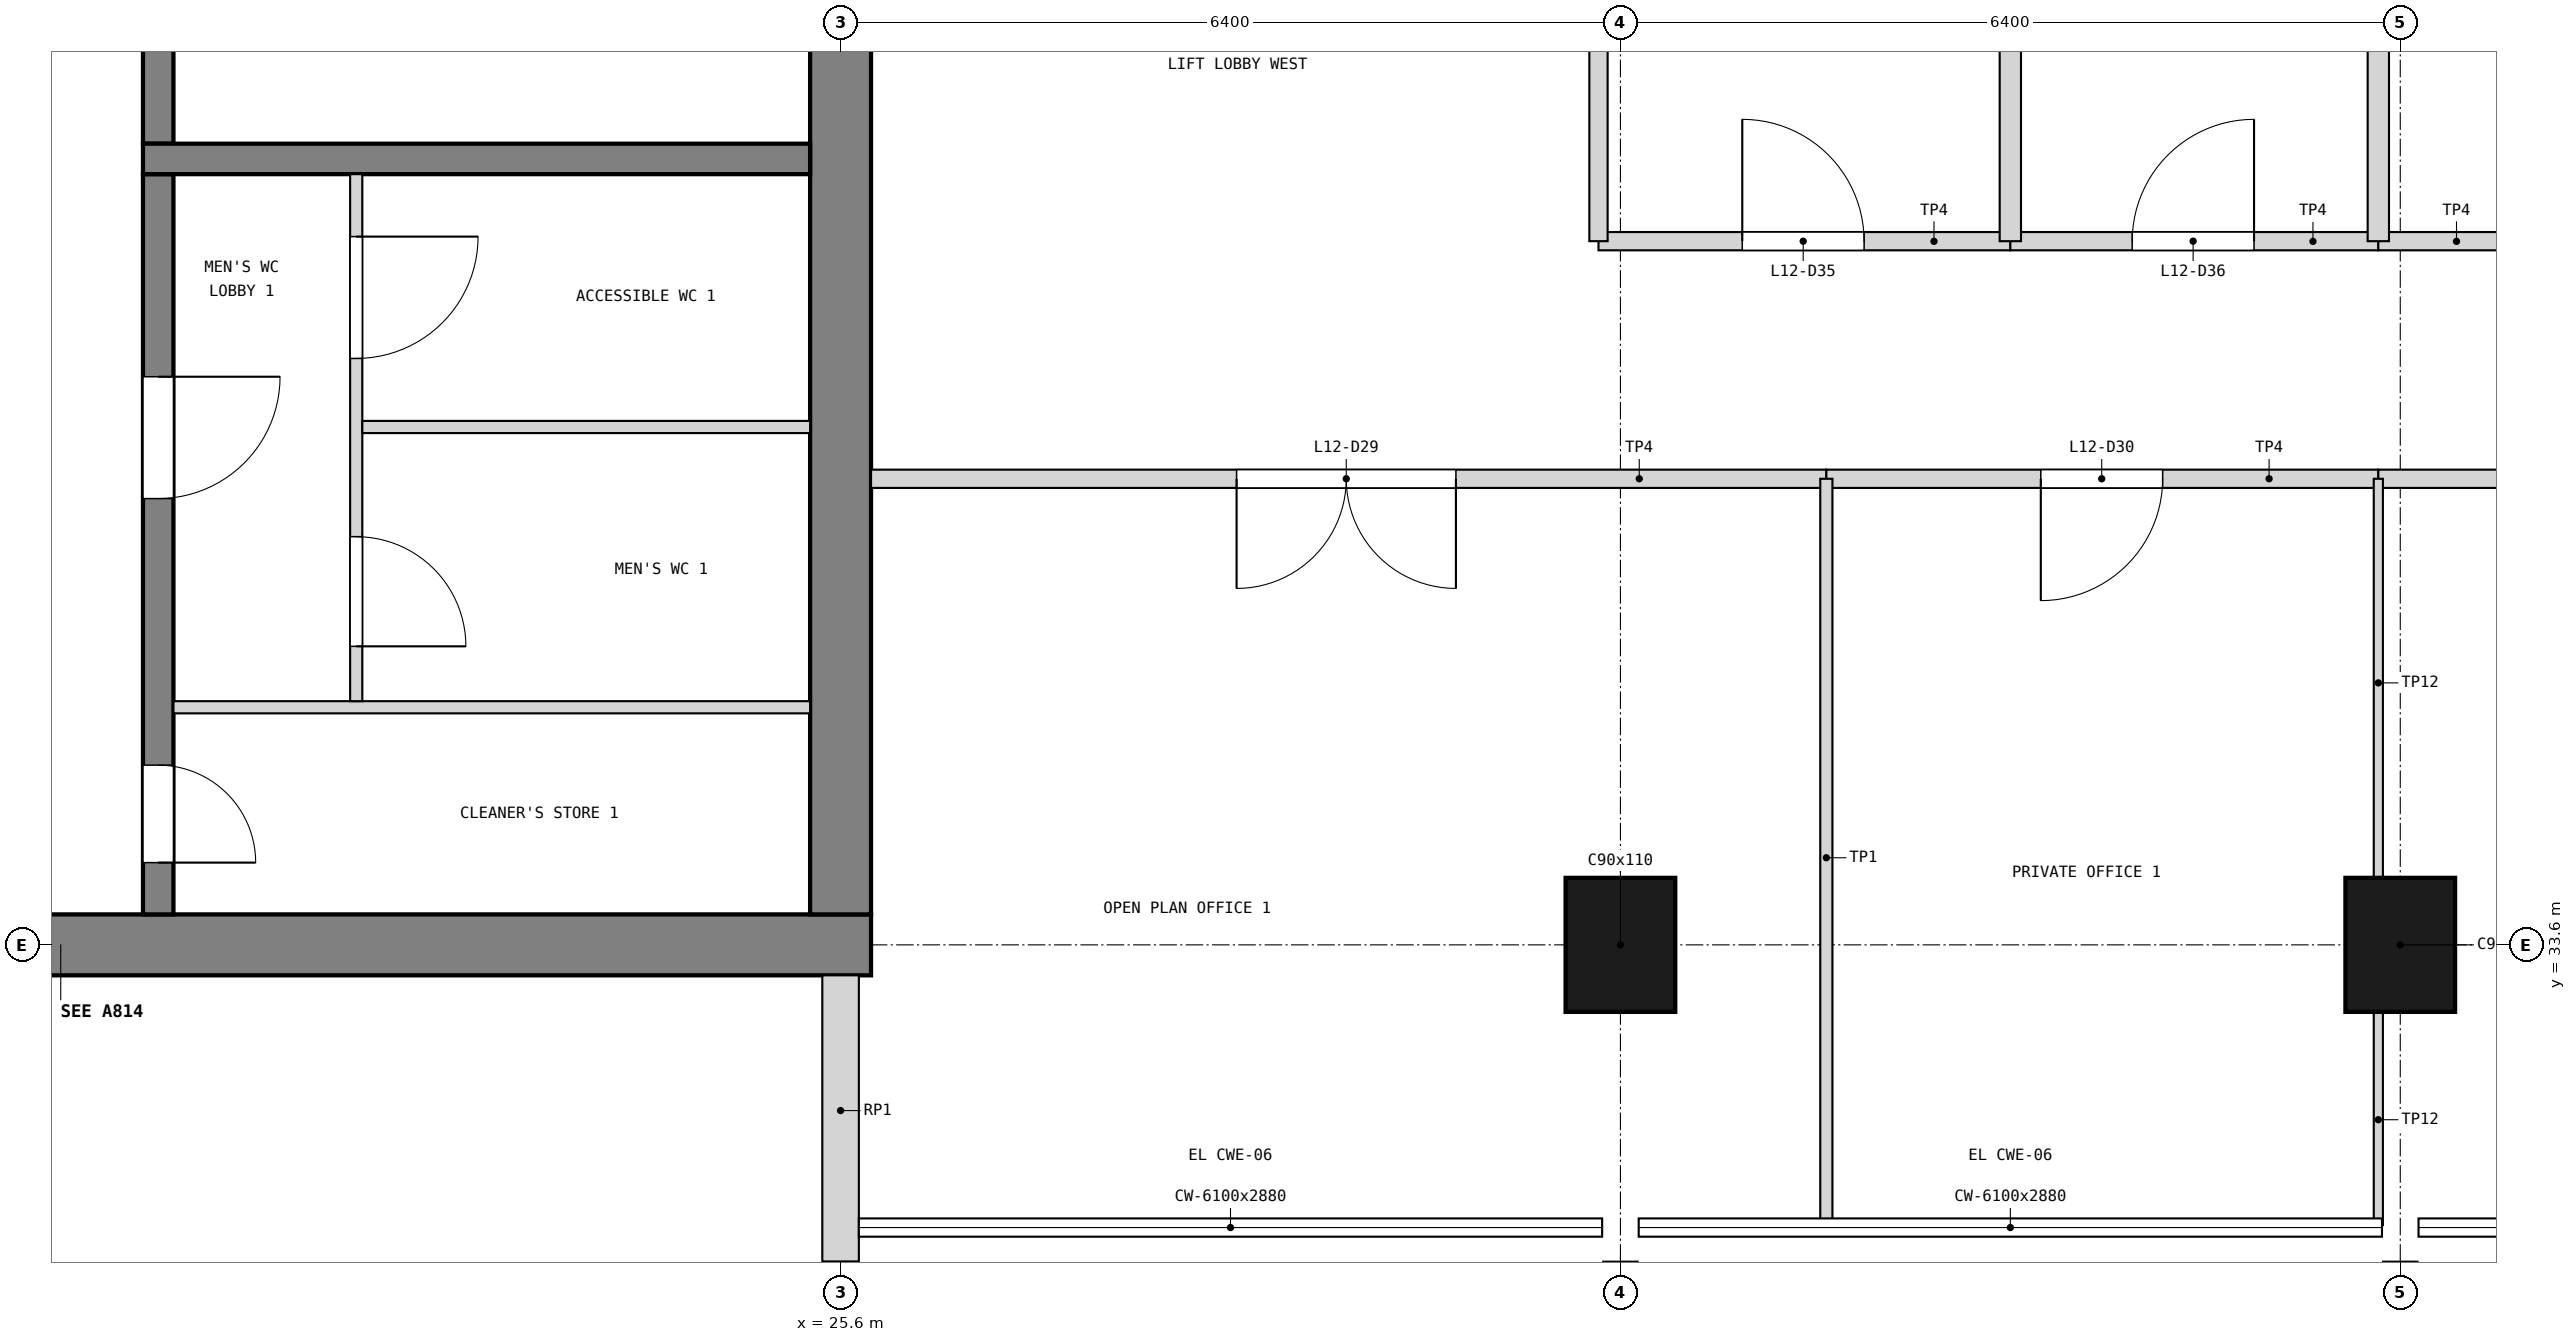
"""IFC4 building model, lengths in metres.
Left out: names, types, materials, properties, quantities, classifications, styles, units other than length and angle.
Written with IfcOpenShell. Run it as: python <this file> out.ifc"""

import sys

from ifc_helpers import new_model, si_unit, direction, frame, frame_2d, origin, origin_2d, place, context, subcontext, project, spatial, rectangle, extrude, element, fill, save


model = new_model("IFC4")
c1 = context("Model", 3, precision=1e-05, world=origin(), true_north=direction((0.0, 1.0)))
c2 = subcontext(c1, "Body", "Model", "MODEL_VIEW")
j1 = project(units=[si_unit("LENGTHUNIT", "METRE"), si_unit("PLANEANGLEUNIT", "RADIAN")], contexts=[c1])
p1 = place(None, origin())
s1 = spatial("IfcSite", under=j1, at=p1, CompositionType="ELEMENT")
p2 = place(p1, origin())
s2 = spatial("IfcBuilding", under=s1, at=p2, CompositionType="ELEMENT")
p3 = place(p2, frame((0.0, 0.0, 48.3)))
s3 = spatial("IfcBuildingStorey", under=s2, at=p3, CompositionType="ELEMENT", Elevation=48.3)
p4 = place(p3, frame((12.55, 33.6, 0.0), z_axis=(0.0, 0.0, 1.0), x_axis=(1.0, 0.0, 0.0)))
e1 = element("IfcWall", 1, at=p4, inside=s3, PredefinedType="SHEAR", context=c2, shape_type="SweptSolid", body=[
    extrude(rectangle(XDim=13.3, YDim=0.5, at=frame_2d((6.65, 0.0))), origin(), (0.0, 0.0, 1.0), 3.9),
])
p5 = place(p4, frame((1.85, 0.0, 1.0)))
e2 = element("IfcOpeningElement", 2, at=p5, cuts=e1, PredefinedType="OPENING", context=c2, shape_type="SweptSolid", body=[
    extrude(rectangle(XDim=0.4, YDim=2.0, at=frame_2d((0.2, 1.0))), frame((0.0, 0.26, 0.0), z_axis=(0.0, -1.0, 0.0), x_axis=(1.0, 0.0, 0.0)), (0.0, 0.0, 1.0), 0.52),
])
p6 = place(p3, frame((25.6, 33.85, 0.0), z_axis=(0.0, 0.0, 1.0), x_axis=(0.0, 1.0, 0.0)))
e3 = element("IfcWall", 3, at=p6, inside=s3, PredefinedType="SHEAR", context=c2, shape_type="SweptSolid", body=[
    extrude(rectangle(XDim=18.7, YDim=0.5, at=frame_2d((9.35, 0.0))), origin(), (0.0, 0.0, 1.0), 3.9),
])
p7 = place(p6, frame((8.35, 0.0, 0.0)))
e4 = element("IfcOpeningElement", 4, at=p7, cuts=e3, PredefinedType="OPENING", context=c2, shape_type="SweptSolid", body=[
    extrude(rectangle(XDim=2.0, YDim=2.1, at=frame_2d((1.0, 1.05))), frame((0.0, 0.26, 0.0), z_axis=(0.0, -1.0, 0.0), x_axis=(1.0, 0.0, 0.0)), (0.0, 0.0, 1.0), 0.52),
])
for number, where, z_axis, x_axis in (
    (5, (32.0, 33.6, 0.0), (0.0, 0.0, 1.0), (1.0, 0.0, 0.0)),
    (6, (38.4, 33.6, 0.0), (0.0, 0.0, 1.0), (1.0, 0.0, 0.0)),
):
    element("IfcColumn", number, at=place(p3, frame(where, z_axis=z_axis, x_axis=x_axis)), inside=s3, PredefinedType="COLUMN", context=c2, shape_type="SweptSolid", body=[
        extrude(rectangle(XDim=0.9, YDim=1.1, at=origin_2d()), origin(), (0.0, 0.0, 1.0), 3.9),
    ])
p8 = place(p3, frame((25.6, 31.0, 0.0), z_axis=(0.0, 0.0, 1.0), x_axis=(0.0, 1.0, 0.0)))
e7 = element("IfcWall", 7, at=p8, inside=s3, PredefinedType="SOLIDWALL", context=c2, shape_type="SweptSolid", body=[
    extrude(rectangle(XDim=2.35, YDim=0.3, at=frame_2d((1.175, 0.0))), origin(), (0.0, 0.0, 1.0), 2.88),
])
p9 = place(p3, frame((20.0, 33.85, 0.0), z_axis=(0.0, 0.0, 1.0), x_axis=(0.0, 1.0, 0.0)))
e8 = element("IfcWall", 8, at=p9, inside=s3, PredefinedType="SOLIDWALL", context=c2, shape_type="SweptSolid", body=[
    extrude(rectangle(XDim=6.075, YDim=0.25, at=frame_2d((3.038, 0.0))), origin(), (0.0, 0.0, 1.0), 3.6),
])
p10 = place(p9, frame((0.425, 0.0, 0.0)))
e9 = element("IfcOpeningElement", 9, at=p10, cuts=e8, PredefinedType="OPENING", context=c2, shape_type="SweptSolid", body=[
    extrude(rectangle(XDim=0.8, YDim=2.1, at=frame_2d((0.4, 1.05))), frame((0.0, 0.135, 0.0), z_axis=(0.0, -1.0, 0.0), x_axis=(1.0, 0.0, 0.0)), (0.0, 0.0, 1.0), 0.27),
])
p11 = place(p9, frame((3.413, 0.0, 0.0)))
e10 = element("IfcOpeningElement", 10, at=p11, cuts=e8, PredefinedType="OPENING", context=c2, shape_type="SweptSolid", body=[
    extrude(rectangle(XDim=1.0, YDim=2.1, at=frame_2d((0.5, 1.05))), frame((0.0, 0.135, 0.0), z_axis=(0.0, -1.0, 0.0), x_axis=(1.0, 0.0, 0.0)), (0.0, 0.0, 1.0), 0.27),
])
p12 = place(p3, frame((20.0, 40.175, 0.0), z_axis=(0.0, 0.0, 1.0), x_axis=(0.0, 1.0, 0.0)))
e11 = element("IfcWall", 11, at=p12, inside=s3, PredefinedType="SOLIDWALL", context=c2, shape_type="SweptSolid", body=[
    extrude(rectangle(XDim=6.05, YDim=0.25, at=frame_2d((3.025, 0.0))), origin(), (0.0, 0.0, 1.0), 3.6),
])
p13 = place(p12, frame((2.025, 0.0, 0.0)))
e12 = element("IfcOpeningElement", 12, at=p13, cuts=e11, PredefinedType="OPENING", context=c2, shape_type="SweptSolid", body=[
    extrude(rectangle(XDim=2.0, YDim=2.1, at=frame_2d((1.0, 1.05))), frame((0.0, 0.135, 0.0), z_axis=(0.0, -1.0, 0.0), x_axis=(1.0, 0.0, 0.0)), (0.0, 0.0, 1.0), 0.27),
])
p14 = place(p3, frame((19.875, 40.05, 0.0), z_axis=(0.0, 0.0, 1.0), x_axis=(1.0, 0.0, 0.0)))
e13 = element("IfcWall", 13, at=p14, inside=s3, PredefinedType="SOLIDWALL", context=c2, shape_type="SweptSolid", body=[
    extrude(rectangle(XDim=5.475, YDim=0.25, at=frame_2d((2.738, 0.0))), origin(), (0.0, 0.0, 1.0), 3.6),
])
p15 = place(p3, frame((20.125, 35.55, 0.0), z_axis=(0.0, 0.0, 1.0), x_axis=(1.0, 0.0, 0.0)))
e14 = element("IfcWall", 14, at=p15, inside=s3, PredefinedType="PARTITIONING", context=c2, shape_type="SweptSolid", body=[
    extrude(rectangle(XDim=5.225, YDim=0.1, at=frame_2d((2.613, 0.0))), origin(), (0.0, 0.0, 1.0), 3.6),
])
p16 = place(p3, frame((21.625, 35.6, 0.0), z_axis=(0.0, 0.0, 1.0), x_axis=(0.0, 1.0, 0.0)))
e15 = element("IfcWall", 15, at=p16, inside=s3, PredefinedType="PARTITIONING", context=c2, shape_type="SweptSolid", body=[
    extrude(rectangle(XDim=4.325, YDim=0.1, at=frame_2d((2.163, 0.0))), origin(), (0.0, 0.0, 1.0), 3.6),
])
p17 = place(p16, frame((0.45, 0.0, 0.0)))
e16 = element("IfcOpeningElement", 16, at=p17, cuts=e15, PredefinedType="OPENING", context=c2, shape_type="SweptSolid", body=[
    extrude(rectangle(XDim=0.9, YDim=2.1, at=frame_2d((0.45, 1.05))), frame((0.0, 0.06, 0.0), z_axis=(0.0, -1.0, 0.0), x_axis=(1.0, 0.0, 0.0)), (0.0, 0.0, 1.0), 0.12),
])
p18 = place(p16, frame((2.812, 0.0, 0.0)))
e17 = element("IfcOpeningElement", 17, at=p18, cuts=e15, PredefinedType="OPENING", context=c2, shape_type="SweptSolid", body=[
    extrude(rectangle(XDim=1.0, YDim=2.1, at=frame_2d((0.5, 1.05))), frame((0.0, 0.06, 0.0), z_axis=(0.0, -1.0, 0.0), x_axis=(1.0, 0.0, 0.0)), (0.0, 0.0, 1.0), 0.12),
])
p19 = place(p3, frame((21.675, 37.85, 0.0), z_axis=(0.0, 0.0, 1.0), x_axis=(1.0, 0.0, 0.0)))
e18 = element("IfcWall", 18, at=p19, inside=s3, PredefinedType="PARTITIONING", context=c2, shape_type="SweptSolid", body=[
    extrude(rectangle(XDim=3.675, YDim=0.1, at=frame_2d((1.837, 0.0))), origin(), (0.0, 0.0, 1.0), 3.6),
])
p20 = place(p3, frame((25.85, 37.425, 0.0), z_axis=(0.0, 0.0, 1.0), x_axis=(1.0, 0.0, 0.0)))
e19 = element("IfcWall", 19, at=p20, inside=s3, PredefinedType="PARTITIONING", context=c2, shape_type="SweptSolid", body=[
    extrude(rectangle(XDim=7.84, YDim=0.15, at=frame_2d((3.92, 0.0))), origin(), (0.0, 0.0, 1.0), 3.68),
])
p21 = place(p20, frame((3.0, 0.0, 0.0)))
e20 = element("IfcOpeningElement", 20, at=p21, cuts=e19, PredefinedType="OPENING", context=c2, shape_type="SweptSolid", body=[
    extrude(rectangle(XDim=1.8, YDim=2.1, at=frame_2d((0.9, 1.05))), frame((0.0, 0.085, 0.0), z_axis=(0.0, -1.0, 0.0), x_axis=(1.0, 0.0, 0.0)), (0.0, 0.0, 1.0), 0.17),
])
p22 = place(p3, frame((33.69, 37.425, 0.0), z_axis=(0.0, 0.0, 1.0), x_axis=(1.0, 0.0, 0.0)))
e21 = element("IfcWall", 21, at=p22, inside=s3, PredefinedType="PARTITIONING", context=c2, shape_type="SweptSolid", body=[
    extrude(rectangle(XDim=4.53, YDim=0.15, at=frame_2d((2.265, 0.0))), origin(), (0.0, 0.0, 1.0), 3.68),
])
p23 = place(p22, frame((1.76, 0.0, 0.0)))
e22 = element("IfcOpeningElement", 22, at=p23, cuts=e21, PredefinedType="OPENING", context=c2, shape_type="SweptSolid", body=[
    extrude(rectangle(XDim=1.0, YDim=2.1, at=frame_2d((0.5, 1.05))), frame((0.0, 0.085, 0.0), z_axis=(0.0, -1.0, 0.0), x_axis=(1.0, 0.0, 0.0)), (0.0, 0.0, 1.0), 0.17),
])
p24 = place(p3, frame((38.22, 37.425, 0.0), z_axis=(0.0, 0.0, 1.0), x_axis=(1.0, 0.0, 0.0)))
e23 = element("IfcWall", 23, at=p24, inside=s3, PredefinedType="PARTITIONING", context=c2, shape_type="SweptSolid", body=[
    extrude(rectangle(XDim=6.4, YDim=0.15, at=frame_2d((3.2, 0.0))), origin(), (0.0, 0.0, 1.0), 3.68),
])
p25 = place(p24, frame((2.68, 0.0, 0.0)))
e24 = element("IfcOpeningElement", 24, at=p25, cuts=e23, PredefinedType="OPENING", context=c2, shape_type="SweptSolid", body=[
    extrude(rectangle(XDim=1.0, YDim=2.1, at=frame_2d((0.5, 1.05))), frame((0.0, 0.085, 0.0), z_axis=(0.0, -1.0, 0.0), x_axis=(1.0, 0.0, 0.0)), (0.0, 0.0, 1.0), 0.17),
])
p26 = place(p3, frame((33.69, 31.3, 0.0), z_axis=(0.0, 0.0, 1.0), x_axis=(0.0, 1.0, 0.0)))
e25 = element("IfcWall", 25, at=p26, inside=s3, PredefinedType="PARTITIONING", context=c2, shape_type="SweptSolid", body=[
    extrude(rectangle(XDim=6.125, YDim=0.1, at=frame_2d((3.062, 0.0))), origin(), (0.0, 0.0, 1.0), 3.68),
])
p27 = place(p3, frame((38.22, 31.3, 0.0), z_axis=(0.0, 0.0, 1.0), x_axis=(0.0, 1.0, 0.0)))
e26 = element("IfcWall", 26, at=p27, inside=s3, PredefinedType="PARTITIONING", context=c2, shape_type="SweptSolid", body=[
    extrude(rectangle(XDim=1.77, YDim=0.075, at=frame_2d((0.885, 0.0))), origin(), (0.0, 0.0, 1.0), 2.78),
])
p28 = place(p3, frame((38.22, 34.13, 0.0), z_axis=(0.0, 0.0, 1.0), x_axis=(0.0, 1.0, 0.0)))
e27 = element("IfcWall", 27, at=p28, inside=s3, PredefinedType="PARTITIONING", context=c2, shape_type="SweptSolid", body=[
    extrude(rectangle(XDim=3.295, YDim=0.075, at=frame_2d((1.647, 0.0))), origin(), (0.0, 0.0, 1.0), 2.78),
])
p29 = place(p3, frame((31.82, 39.375, 0.0), z_axis=(0.0, 0.0, 1.0), x_axis=(1.0, 0.0, 0.0)))
e28 = element("IfcWall", 28, at=p29, inside=s3, PredefinedType="PARTITIONING", context=c2, shape_type="SweptSolid", body=[
    extrude(rectangle(XDim=3.38, YDim=0.15, at=frame_2d((1.69, 0.0))), origin(), (0.0, 0.0, 1.0), 3.68),
])
p30 = place(p29, frame((1.18, 0.0, 0.0)))
e29 = element("IfcOpeningElement", 29, at=p30, cuts=e28, PredefinedType="OPENING", context=c2, shape_type="SweptSolid", body=[
    extrude(rectangle(XDim=1.0, YDim=2.1, at=frame_2d((0.5, 1.05))), frame((0.0, 0.085, 0.0), z_axis=(0.0, -1.0, 0.0), x_axis=(1.0, 0.0, 0.0)), (0.0, 0.0, 1.0), 0.17),
])
p31 = place(p3, frame((35.2, 39.375, 0.0), z_axis=(0.0, 0.0, 1.0), x_axis=(1.0, 0.0, 0.0)))
e30 = element("IfcWall", 30, at=p31, inside=s3, PredefinedType="PARTITIONING", context=c2, shape_type="SweptSolid", body=[
    extrude(rectangle(XDim=3.02, YDim=0.15, at=frame_2d((1.51, 0.0))), origin(), (0.0, 0.0, 1.0), 3.68),
])
p32 = place(p31, frame((1.0, 0.0, 0.0)))
e31 = element("IfcOpeningElement", 31, at=p32, cuts=e30, PredefinedType="OPENING", context=c2, shape_type="SweptSolid", body=[
    extrude(rectangle(XDim=1.0, YDim=2.1, at=frame_2d((0.5, 1.05))), frame((0.0, 0.085, 0.0), z_axis=(0.0, -1.0, 0.0), x_axis=(1.0, 0.0, 0.0)), (0.0, 0.0, 1.0), 0.17),
])
p33 = place(p3, frame((38.22, 39.375, 0.0), z_axis=(0.0, 0.0, 1.0), x_axis=(1.0, 0.0, 0.0)))
e32 = element("IfcWall", 32, at=p33, inside=s3, PredefinedType="PARTITIONING", context=c2, shape_type="SweptSolid", body=[
    extrude(rectangle(XDim=3.38, YDim=0.15, at=frame_2d((1.69, 0.0))), origin(), (0.0, 0.0, 1.0), 3.68),
])
p34 = place(p33, frame((1.23, 0.0, 0.0)))
e33 = element("IfcOpeningElement", 33, at=p34, cuts=e32, PredefinedType="OPENING", context=c2, shape_type="SweptSolid", body=[
    extrude(rectangle(XDim=1.0, YDim=2.1, at=frame_2d((0.5, 1.05))), frame((0.0, 0.085, 0.0), z_axis=(0.0, -1.0, 0.0), x_axis=(1.0, 0.0, 0.0)), (0.0, 0.0, 1.0), 0.17),
])
p35 = place(p3, frame((35.2, 39.375, 0.0), z_axis=(0.0, 0.0, 1.0), x_axis=(0.0, 1.0, 0.0)))
e34 = element("IfcWall", 34, at=p35, inside=s3, PredefinedType="PARTITIONING", context=c2, shape_type="SweptSolid", body=[
    extrude(rectangle(XDim=7.65, YDim=0.175, at=frame_2d((3.825, 0.0))), origin(), (0.0, 0.0, 1.0), 3.08),
])
p36 = place(p3, frame((38.22, 39.375, 0.0), z_axis=(0.0, 0.0, 1.0), x_axis=(0.0, 1.0, 0.0)))
e35 = element("IfcWall", 35, at=p36, inside=s3, PredefinedType="PARTITIONING", context=c2, shape_type="SweptSolid", body=[
    extrude(rectangle(XDim=3.433, YDim=0.175, at=frame_2d((1.716, 0.0))), origin(), (0.0, 0.0, 1.0), 2.78),
])
p37 = place(p3, frame((31.82, 39.375, 0.0), z_axis=(0.0, 0.0, 1.0), x_axis=(0.0, 1.0, 0.0)))
e36 = element("IfcWall", 36, at=p37, inside=s3, PredefinedType="PARTITIONING", context=c2, shape_type="SweptSolid", body=[
    extrude(rectangle(XDim=3.433, YDim=0.15, at=frame_2d((1.716, 0.0))), origin(), (0.0, 0.0, 1.0), 2.78),
])
p38 = place(p10, frame((0.8, 0.0, 0.0), z_axis=(0.0, 0.0, 1.0), x_axis=(-1.0, 0.0, 0.0)))
e37 = element("IfcDoor", 37, at=p38, inside=s3, OperationType="SINGLE_SWING_RIGHT", PredefinedType="DOOR", context=c2, shape_type="SweptSolid", body=[
    extrude(rectangle(XDim=0.8, YDim=2.1, at=frame_2d((0.4, 1.05))), frame((0.0, 0.025, 0.0), z_axis=(0.0, -1.0, 0.0), x_axis=(1.0, 0.0, 0.0)), (0.0, 0.0, 1.0), 0.05),
])
fill(e9, e37)
p39 = place(p11, frame((1.0, 0.0, 0.0), z_axis=(0.0, 0.0, 1.0), x_axis=(-1.0, 0.0, 0.0)))
e38 = element("IfcDoor", 38, at=p39, inside=s3, OperationType="SINGLE_SWING_LEFT", PredefinedType="DOOR", context=c2, shape_type="SweptSolid", body=[
    extrude(rectangle(XDim=1.0, YDim=2.1, at=frame_2d((0.5, 1.05))), frame((0.0, 0.025, 0.0), z_axis=(0.0, -1.0, 0.0), x_axis=(1.0, 0.0, 0.0)), (0.0, 0.0, 1.0), 0.05),
])
fill(e10, e38)
p40 = place(p17, frame((0.9, 0.0, 0.0), z_axis=(0.0, 0.0, 1.0), x_axis=(-1.0, 0.0, 0.0)))
e39 = element("IfcDoor", 39, at=p40, inside=s3, OperationType="SINGLE_SWING_RIGHT", PredefinedType="DOOR", context=c2, shape_type="SweptSolid", body=[
    extrude(rectangle(XDim=0.9, YDim=2.1, at=frame_2d((0.45, 1.05))), frame((0.0, 0.025, 0.0), z_axis=(0.0, -1.0, 0.0), x_axis=(1.0, 0.0, 0.0)), (0.0, 0.0, 1.0), 0.05),
])
fill(e16, e39)
p41 = place(p18, frame((1.0, 0.0, 0.0), z_axis=(0.0, 0.0, 1.0), x_axis=(-1.0, 0.0, 0.0)))
e40 = element("IfcDoor", 40, at=p41, inside=s3, OperationType="SINGLE_SWING_LEFT", PredefinedType="DOOR", context=c2, shape_type="SweptSolid", body=[
    extrude(rectangle(XDim=1.0, YDim=2.1, at=frame_2d((0.5, 1.05))), frame((0.0, 0.025, 0.0), z_axis=(0.0, -1.0, 0.0), x_axis=(1.0, 0.0, 0.0)), (0.0, 0.0, 1.0), 0.05),
])
fill(e17, e40)
p42 = place(p21, frame((1.8, 0.0, 0.0), z_axis=(0.0, 0.0, 1.0), x_axis=(-1.0, 0.0, 0.0)))
e41 = element("IfcDoor", 41, at=p42, inside=s3, OperationType="DOUBLE_DOOR_SINGLE_SWING", PredefinedType="DOOR", context=c2, shape_type="SweptSolid", body=[
    extrude(rectangle(XDim=1.8, YDim=2.1, at=frame_2d((0.9, 1.05))), frame((0.0, 0.025, 0.0), z_axis=(0.0, -1.0, 0.0), x_axis=(1.0, 0.0, 0.0)), (0.0, 0.0, 1.0), 0.05),
])
fill(e20, e41)
p43 = place(p23, frame((1.0, 0.0, 0.0), z_axis=(0.0, 0.0, 1.0), x_axis=(-1.0, 0.0, 0.0)))
e42 = element("IfcDoor", 42, at=p43, inside=s3, OperationType="SINGLE_SWING_RIGHT", PredefinedType="DOOR", context=c2, shape_type="SweptSolid", body=[
    extrude(rectangle(XDim=1.0, YDim=2.1, at=frame_2d((0.5, 1.05))), frame((0.0, 0.025, 0.0), z_axis=(0.0, -1.0, 0.0), x_axis=(1.0, 0.0, 0.0)), (0.0, 0.0, 1.0), 0.05),
])
fill(e22, e42)
p44 = place(p30, origin())
e43 = element("IfcDoor", 43, at=p44, inside=s3, OperationType="SINGLE_SWING_LEFT", PredefinedType="DOOR", context=c2, shape_type="SweptSolid", body=[
    extrude(rectangle(XDim=1.0, YDim=2.1, at=frame_2d((0.5, 1.05))), frame((0.0, 0.025, 0.0), z_axis=(0.0, -1.0, 0.0), x_axis=(1.0, 0.0, 0.0)), (0.0, 0.0, 1.0), 0.05),
])
fill(e29, e43)
p45 = place(p32, origin())
e44 = element("IfcDoor", 44, at=p45, inside=s3, OperationType="SINGLE_SWING_RIGHT", PredefinedType="DOOR", context=c2, shape_type="SweptSolid", body=[
    extrude(rectangle(XDim=1.0, YDim=2.1, at=frame_2d((0.5, 1.05))), frame((0.0, 0.025, 0.0), z_axis=(0.0, -1.0, 0.0), x_axis=(1.0, 0.0, 0.0)), (0.0, 0.0, 1.0), 0.05),
])
fill(e31, e44)
save(model, sys.argv[1])
